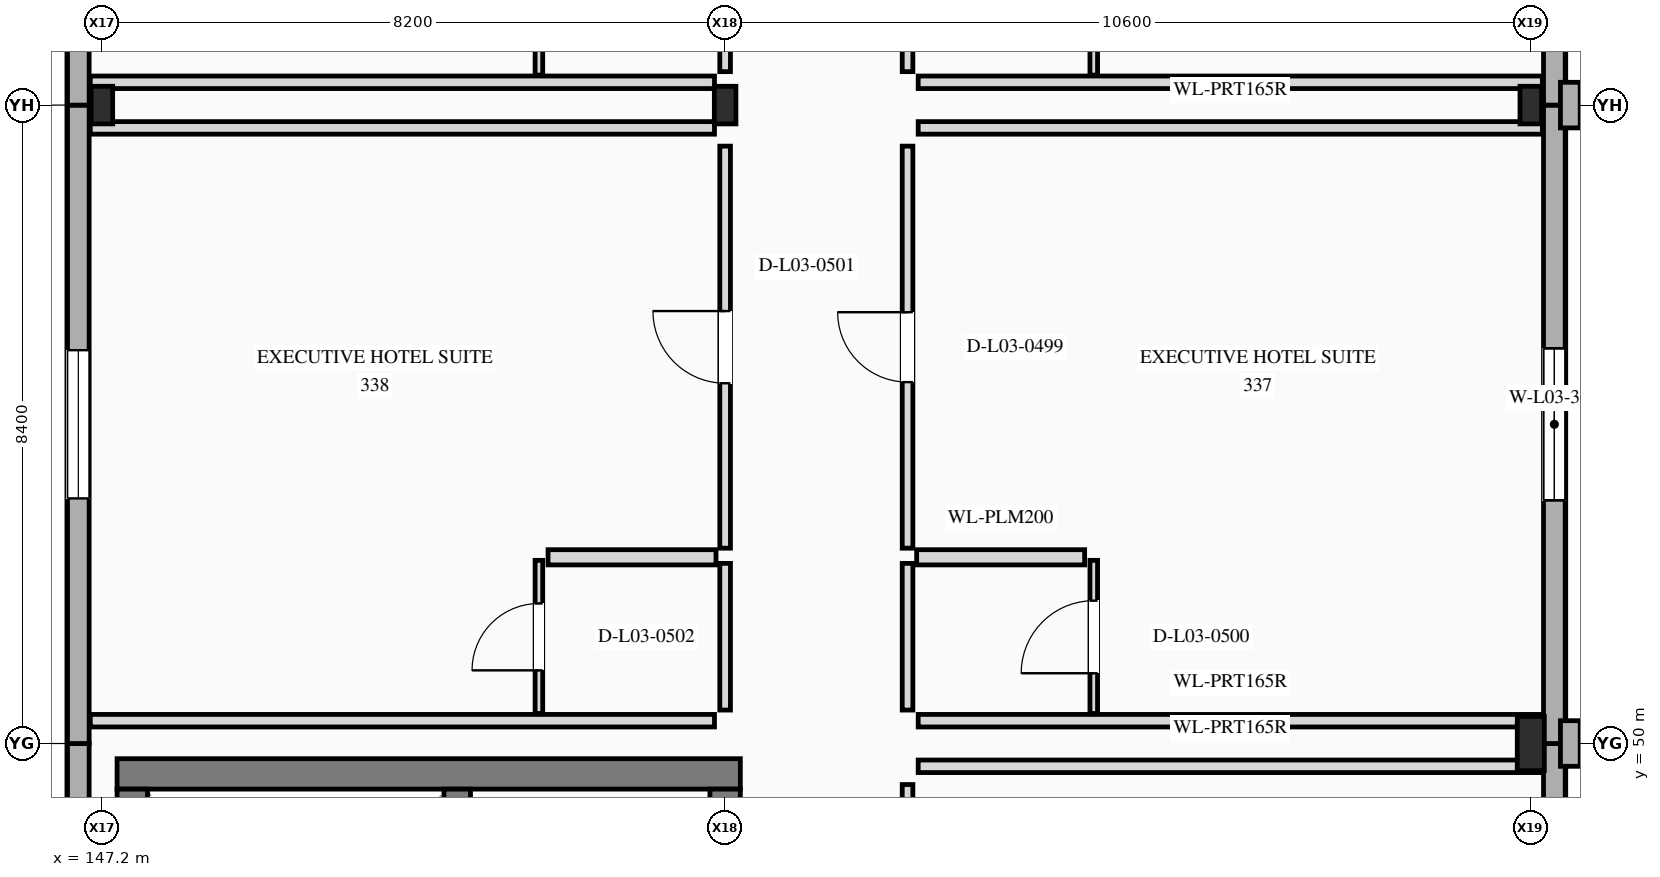
"""IFC4 building model, lengths in metres.
Left out: names, types, materials, properties, quantities, classifications, styles, units other than length and angle.
Written with IfcOpenShell. Run it as: python <this file> out.ifc"""

import sys

from ifc_helpers import new_model, si_unit, direction, frame, frame_2d, origin, origin_2d, place, context, subcontext, project, spatial, rectangle, i_section, extrude, element, fill, save


model = new_model("IFC4")
c1 = context("Model", 3, precision=1e-05, world=origin(), true_north=direction((0.0, 1.0)))
c2 = subcontext(c1, "Body", "Model", "MODEL_VIEW")
j1 = project(units=[si_unit("LENGTHUNIT", "METRE"), si_unit("PLANEANGLEUNIT", "RADIAN")], contexts=[c1])
p1 = place(None, origin())
s1 = spatial("IfcSite", under=j1, at=p1, CompositionType="ELEMENT")
p2 = place(p1, origin())
s2 = spatial("IfcBuilding", under=s1, at=p2, CompositionType="ELEMENT")
p3 = place(p2, frame((0.0, 0.0, 15.6)))
s3 = spatial("IfcBuildingStorey", under=s2, at=p3, CompositionType="ELEMENT", Elevation=15.6)
for number, where, z_axis, x_axis in (
    (1, (147.2, 58.4, 0.0), (0.0, 0.0, 1.0), (1.0, 0.0, 0.0)),
    (2, (155.4, 58.4, 0.0), (0.0, 0.0, 1.0), (1.0, 0.0, 0.0)),
):
    element("IfcColumn", number, at=place(p3, frame(where, z_axis=z_axis, x_axis=x_axis)), inside=s3, PredefinedType="COLUMN", context=c2, shape_type="SweptSolid", body=[
        extrude(i_section(OverallWidth=0.284, OverallDepth=0.495, WebThickness=0.019, FlangeThickness=0.033, at=origin_2d()), origin(), (0.0, 0.0, 1.0), 3.9),
    ])
p4 = place(p3, frame((166.0, 50.0, 0.0), z_axis=(0.0, 0.0, 1.0), x_axis=(1.0, 0.0, 0.0)))
e3 = element("IfcColumn", 3, at=p4, inside=s3, PredefinedType="COLUMN", context=c2, shape_type="SweptSolid", body=[
    extrude(i_section(OverallWidth=0.356, OverallDepth=0.714, WebThickness=0.019, FlangeThickness=0.034, at=origin_2d()), origin(), (0.0, 0.0, 1.0), 3.9),
])
p5 = place(p3, frame((166.0, 58.4, 0.0), z_axis=(0.0, 0.0, 1.0), x_axis=(1.0, 0.0, 0.0)))
e4 = element("IfcColumn", 4, at=p5, inside=s3, PredefinedType="COLUMN", context=c2, shape_type="SweptSolid", body=[
    extrude(i_section(OverallWidth=0.284, OverallDepth=0.495, WebThickness=0.019, FlangeThickness=0.033, at=origin_2d()), origin(), (0.0, 0.0, 1.0), 3.9),
])
p6 = place(p3, frame((166.31, 47.86, 0.0), z_axis=(0.0, 0.0, 1.0), x_axis=(0.0, 1.0, 0.0)))
e5 = element("IfcWall", 5, at=p6, inside=s3, PredefinedType="STANDARD", context=c2, shape_type="SweptSolid", body=[
    extrude(rectangle(XDim=2.14, YDim=0.285, at=frame_2d((1.07, 0.0))), origin(), (0.0, 0.0, 1.0), 3.9),
])
p7 = place(p3, frame((166.31, 50.0, 0.0), z_axis=(0.0, 0.0, 1.0), x_axis=(0.0, 1.0, 0.0)))
e6 = element("IfcWall", 6, at=p7, inside=s3, PredefinedType="STANDARD", context=c2, shape_type="SweptSolid", body=[
    extrude(rectangle(XDim=8.4, YDim=0.285, at=frame_2d((4.2, 0.0))), origin(), (0.0, 0.0, 1.0), 3.9),
])
p8 = place(p7, frame((3.2, 0.0, 0.85)))
e7 = element("IfcOpeningElement", 7, at=p8, cuts=e6, PredefinedType="OPENING", context=c2, shape_type="SweptSolid", body=[
    extrude(rectangle(XDim=2.0, YDim=1.65, at=frame_2d((1.0, 0.825))), frame((0.0, 0.152, 0.0), z_axis=(0.0, -1.0, 0.0), x_axis=(1.0, 0.0, 0.0)), (0.0, 0.0, 1.0), 0.305),
])
p9 = place(p3, frame((166.52, 49.7, 0.0), z_axis=(0.0, 0.0, 1.0), x_axis=(0.0, 1.0, 0.0)))
e8 = element("IfcWall", 8, at=p9, inside=s3, PredefinedType="ELEMENTEDWALL", context=c2, shape_type="SweptSolid", body=[
    extrude(rectangle(XDim=0.6, YDim=0.26, at=frame_2d((0.3, 0.0))), origin(), (0.0, 0.0, 1.0), 3.9),
])
p10 = place(p3, frame((166.31, 58.4, 0.0), z_axis=(0.0, 0.0, 1.0), x_axis=(0.0, 1.0, 0.0)))
e9 = element("IfcWall", 9, at=p10, inside=s3, PredefinedType="STANDARD", context=c2, shape_type="SweptSolid", body=[
    extrude(rectangle(XDim=8.71, YDim=0.285, at=frame_2d((4.355, 0.0))), origin(), (0.0, 0.0, 1.0), 3.9),
])
p11 = place(p10, frame((3.2, 0.0, 0.85)))
e10 = element("IfcOpeningElement", 10, at=p11, cuts=e9, PredefinedType="OPENING", context=c2, shape_type="SweptSolid", body=[
    extrude(rectangle(XDim=2.0, YDim=1.65, at=frame_2d((1.0, 0.825))), frame((0.0, 0.152, 0.0), z_axis=(0.0, -1.0, 0.0), x_axis=(1.0, 0.0, 0.0)), (0.0, 0.0, 1.0), 0.305),
])
p12 = place(p3, frame((166.52, 58.1, 0.0), z_axis=(0.0, 0.0, 1.0), x_axis=(0.0, 1.0, 0.0)))
e11 = element("IfcWall", 11, at=p12, inside=s3, PredefinedType="ELEMENTEDWALL", context=c2, shape_type="SweptSolid", body=[
    extrude(rectangle(XDim=0.6, YDim=0.26, at=frame_2d((0.3, 0.0))), origin(), (0.0, 0.0, 1.0), 3.9),
])
p13 = place(p3, frame((146.89, 41.6, 0.0), z_axis=(0.0, 0.0, 1.0), x_axis=(0.0, 1.0, 0.0)))
e12 = element("IfcWall", 12, at=p13, inside=s3, PredefinedType="STANDARD", context=c2, shape_type="SweptSolid", body=[
    extrude(rectangle(XDim=8.4, YDim=0.285, at=frame_2d((4.2, 0.0))), origin(), (0.0, 0.0, 1.0), 3.9),
])
p14 = place(p3, frame((146.89, 50.0, 0.0), z_axis=(0.0, 0.0, 1.0), x_axis=(0.0, 1.0, 0.0)))
e13 = element("IfcWall", 13, at=p14, inside=s3, PredefinedType="STANDARD", context=c2, shape_type="SweptSolid", body=[
    extrude(rectangle(XDim=8.4, YDim=0.285, at=frame_2d((4.2, 0.0))), origin(), (0.0, 0.0, 1.0), 3.9),
])
p15 = place(p14, frame((3.225, 0.0, 0.85)))
e14 = element("IfcOpeningElement", 14, at=p15, cuts=e13, PredefinedType="OPENING", context=c2, shape_type="SweptSolid", body=[
    extrude(rectangle(XDim=1.95, YDim=1.85, at=frame_2d((0.975, 0.925))), frame((0.0, 0.152, 0.0), z_axis=(0.0, -1.0, 0.0), x_axis=(1.0, 0.0, 0.0)), (0.0, 0.0, 1.0), 0.305),
])
p16 = place(p3, frame((146.89, 58.4, 0.0), z_axis=(0.0, 0.0, 1.0), x_axis=(0.0, 1.0, 0.0)))
e15 = element("IfcWall", 15, at=p16, inside=s3, PredefinedType="STANDARD", context=c2, shape_type="SweptSolid", body=[
    extrude(rectangle(XDim=8.71, YDim=0.285, at=frame_2d((4.355, 0.0))), origin(), (0.0, 0.0, 1.0), 3.9),
])
p17 = place(p16, frame((3.2, 0.0, 0.85)))
e16 = element("IfcOpeningElement", 16, at=p17, cuts=e15, PredefinedType="OPENING", context=c2, shape_type="SweptSolid", body=[
    extrude(rectangle(XDim=2.0, YDim=1.65, at=frame_2d((1.0, 0.825))), frame((0.0, 0.152, 0.0), z_axis=(0.0, -1.0, 0.0), x_axis=(1.0, 0.0, 0.0)), (0.0, 0.0, 1.0), 0.305),
])
p18 = place(p3, frame((155.6, 49.6, 0.0), z_axis=(0.0, 0.0, 1.0), x_axis=(-1.0, 0.0, 0.0)))
e17 = element("IfcWall", 17, at=p18, inside=s3, PredefinedType="SHEAR", context=c2, shape_type="SweptSolid", body=[
    extrude(rectangle(XDim=8.2, YDim=0.4, at=frame_2d((4.1, 0.0))), origin(), (0.0, 0.0, 1.0), 3.9),
])
p19 = place(p3, frame((147.6, 49.4, 0.0), z_axis=(0.0, 0.0, 1.0), x_axis=(0.0, -1.0, 0.0)))
e18 = element("IfcWall", 18, at=p19, inside=s3, PredefinedType="SHEAR", context=c2, shape_type="SweptSolid", body=[
    extrude(rectangle(XDim=9.4, YDim=0.4, at=frame_2d((4.7, 0.0))), origin(), (0.0, 0.0, 1.0), 3.9),
])
p20 = place(p3, frame((155.4, 40.0, 0.0), z_axis=(0.0, 0.0, 1.0), x_axis=(0.0, 1.0, 0.0)))
e19 = element("IfcWall", 19, at=p20, inside=s3, PredefinedType="SHEAR", context=c2, shape_type="SweptSolid", body=[
    extrude(rectangle(XDim=9.4, YDim=0.4, at=frame_2d((4.7, 0.0))), origin(), (0.0, 0.0, 1.0), 3.9),
])
p21 = place(p20, frame((1.05, 0.0, 0.0)))
e20 = element("IfcOpeningElement", 20, at=p21, cuts=e19, PredefinedType="OPENING", context=c2, shape_type="SweptSolid", body=[
    extrude(rectangle(XDim=1.1, YDim=2.2, at=frame_2d((0.55, 1.1))), frame((0.0, 0.21, 0.0), z_axis=(0.0, -1.0, 0.0), x_axis=(1.0, 0.0, 0.0)), (0.0, 0.0, 1.0), 0.42),
])
p22 = place(p20, frame((3.95, 0.0, 0.0)))
e21 = element("IfcOpeningElement", 21, at=p22, cuts=e19, PredefinedType="OPENING", context=c2, shape_type="SweptSolid", body=[
    extrude(rectangle(XDim=1.1, YDim=2.2, at=frame_2d((0.55, 1.1))), frame((0.0, 0.21, 0.0), z_axis=(0.0, -1.0, 0.0), x_axis=(1.0, 0.0, 0.0)), (0.0, 0.0, 1.0), 0.42),
])
p23 = place(p20, frame((6.875, 0.0, 0.0)))
e22 = element("IfcOpeningElement", 22, at=p23, cuts=e19, PredefinedType="OPENING", context=c2, shape_type="SweptSolid", body=[
    extrude(rectangle(XDim=1.35, YDim=2.3, at=frame_2d((0.675, 1.15))), frame((0.0, 0.21, 0.0), z_axis=(0.0, -1.0, 0.0), x_axis=(1.0, 0.0, 0.0)), (0.0, 0.0, 1.0), 0.42),
])
p24 = place(p3, frame((151.875, 40.0, 0.0), z_axis=(0.0, 0.0, 1.0), x_axis=(0.0, 1.0, 0.0)))
e23 = element("IfcWall", 23, at=p24, inside=s3, PredefinedType="SHEAR", context=c2, shape_type="SweptSolid", body=[
    extrude(rectangle(XDim=9.4, YDim=0.35, at=frame_2d((4.7, 0.0))), origin(), (0.0, 0.0, 1.0), 3.9),
])
p25 = place(p3, frame((157.8, 44.17, 0.0), z_axis=(0.0, 0.0, 1.0), x_axis=(0.0, 1.0, 0.0)))
e24 = element("IfcWall", 24, at=p25, inside=s3, PredefinedType="PARTITIONING", context=c2, shape_type="SweptSolid", body=[
    extrude(rectangle(XDim=5.29, YDim=0.14, at=frame_2d((2.645, 0.0))), origin(), (0.0, 0.0, 1.0), 3.6),
])
p26 = place(p25, frame((2.11, 0.0, 0.0)))
e25 = element("IfcOpeningElement", 25, at=p26, cuts=e24, PredefinedType="OPENING", context=c2, shape_type="SweptSolid", body=[
    extrude(rectangle(XDim=1.07, YDim=2.25, at=frame_2d((0.535, 1.125))), frame((0.0, 0.08, 0.0), z_axis=(0.0, -1.0, 0.0), x_axis=(1.0, 0.0, 0.0)), (0.0, 0.0, 1.0), 0.16),
])
p27 = place(p3, frame((157.94, 49.7, 0.0), z_axis=(0.0, 0.0, 1.0), x_axis=(1.0, 0.0, 0.0)))
e26 = element("IfcWall", 26, at=p27, inside=s3, PredefinedType="PARTITIONING", context=c2, shape_type="SweptSolid", body=[
    extrude(rectangle(XDim=8.213, YDim=0.165, at=frame_2d((4.106, 0.0))), origin(), (0.0, 0.0, 1.0), 2.99),
])
p28 = place(p3, frame((157.8, 50.44, 0.0), z_axis=(0.0, 0.0, 1.0), x_axis=(0.0, 1.0, 0.0)))
e27 = element("IfcWall", 27, at=p28, inside=s3, PredefinedType="PARTITIONING", context=c2, shape_type="SweptSolid", body=[
    extrude(rectangle(XDim=1.93, YDim=0.14, at=frame_2d((0.965, 0.0))), origin(), (0.0, 0.0, 1.0), 3.153),
])
p29 = place(p3, frame((157.8, 52.57, 0.0), z_axis=(0.0, 0.0, 1.0), x_axis=(0.0, 1.0, 0.0)))
e28 = element("IfcWall", 28, at=p29, inside=s3, PredefinedType="PARTITIONING", context=c2, shape_type="SweptSolid", body=[
    extrude(rectangle(XDim=5.29, YDim=0.14, at=frame_2d((2.645, 0.0))), origin(), (0.0, 0.0, 1.0), 3.153),
])
p30 = place(p29, frame((2.185, 0.0, 0.0)))
e29 = element("IfcOpeningElement", 29, at=p30, cuts=e28, PredefinedType="OPENING", context=c2, shape_type="SweptSolid", body=[
    extrude(rectangle(XDim=0.92, YDim=2.3, at=frame_2d((0.46, 1.15))), frame((0.0, 0.08, 0.0), z_axis=(0.0, -1.0, 0.0), x_axis=(1.0, 0.0, 0.0)), (0.0, 0.0, 1.0), 0.16),
])
for number, where, z_axis, x_axis in (
    (30, (157.94, 50.3, 0.0), (0.0, 0.0, 1.0), (1.0, 0.0, 0.0)),
    (31, (157.94, 58.1, 0.0), (0.0, 0.0, 1.0), (1.0, 0.0, 0.0)),
):
    element("IfcWall", number, at=place(p3, frame(where, z_axis=z_axis, x_axis=x_axis)), inside=s3, PredefinedType="PARTITIONING", context=c2, shape_type="SweptSolid", body=[
        extrude(rectangle(XDim=8.213, YDim=0.165, at=frame_2d((4.106, 0.0))), origin(), (0.0, 0.0, 1.0), 2.99),
    ])
p31 = place(p3, frame((157.92, 52.45, 0.0), z_axis=(0.0, 0.0, 1.0), x_axis=(1.0, 0.0, 0.0)))
e32 = element("IfcWall", 32, at=p31, inside=s3, PredefinedType="PLUMBINGWALL", context=c2, shape_type="SweptSolid", body=[
    extrude(rectangle(XDim=2.21, YDim=0.2, at=frame_2d((1.105, 0.0))), origin(), (0.0, 0.0, 1.0), 3.6),
])
p32 = place(p3, frame((160.25, 50.395, 0.0), z_axis=(0.0, 0.0, 1.0), x_axis=(0.0, 1.0, 0.0)))
e33 = element("IfcWall", 33, at=p32, inside=s3, PredefinedType="PARTITIONING", context=c2, shape_type="SweptSolid", body=[
    extrude(rectangle(XDim=2.015, YDim=0.1, at=frame_2d((1.008, 0.0))), origin(), (0.0, 0.0, 1.0), 3.153),
])
p33 = place(p32, frame((0.53, 0.0, 0.0)))
e34 = element("IfcOpeningElement", 34, at=p33, cuts=e33, PredefinedType="OPENING", context=c2, shape_type="SweptSolid", body=[
    extrude(rectangle(XDim=0.955, YDim=2.22, at=frame_2d((0.478, 1.11))), frame((0.0, 0.06, 0.0), z_axis=(0.0, -1.0, 0.0), x_axis=(1.0, 0.0, 0.0)), (0.0, 0.0, 1.0), 0.12),
])
p34 = place(p3, frame((155.4, 50.44, 0.0), z_axis=(0.0, 0.0, 1.0), x_axis=(0.0, 1.0, 0.0)))
e35 = element("IfcWall", 35, at=p34, inside=s3, PredefinedType="PARTITIONING", context=c2, shape_type="SweptSolid", body=[
    extrude(rectangle(XDim=1.93, YDim=0.14, at=frame_2d((0.965, 0.0))), origin(), (0.0, 0.0, 1.0), 2.99),
])
p35 = place(p3, frame((155.4, 52.57, 0.0), z_axis=(0.0, 0.0, 1.0), x_axis=(0.0, 1.0, 0.0)))
e36 = element("IfcWall", 36, at=p35, inside=s3, PredefinedType="PARTITIONING", context=c2, shape_type="SweptSolid", body=[
    extrude(rectangle(XDim=5.29, YDim=0.14, at=frame_2d((2.645, 0.0))), origin(), (0.0, 0.0, 1.0), 2.99),
])
p36 = place(p35, frame((2.17, 0.0, 0.0)))
e37 = element("IfcOpeningElement", 37, at=p36, cuts=e36, PredefinedType="OPENING", context=c2, shape_type="SweptSolid", body=[
    extrude(rectangle(XDim=0.95, YDim=2.3, at=frame_2d((0.475, 1.15))), frame((0.0, 0.08, 0.0), z_axis=(0.0, -1.0, 0.0), x_axis=(1.0, 0.0, 0.0)), (0.0, 0.0, 1.0), 0.16),
])
p37 = place(p3, frame((147.048, 50.3, 0.0), z_axis=(0.0, 0.0, 1.0), x_axis=(1.0, 0.0, 0.0)))
e38 = element("IfcWall", 38, at=p37, inside=s3, PredefinedType="PARTITIONING", context=c2, shape_type="SweptSolid", body=[
    extrude(rectangle(XDim=8.212, YDim=0.165, at=frame_2d((4.106, 0.0))), origin(), (0.0, 0.0, 1.0), 3.6),
])
p38 = place(p3, frame((147.048, 58.1, 0.0), z_axis=(0.0, 0.0, 1.0), x_axis=(1.0, 0.0, 0.0)))
e39 = element("IfcWall", 39, at=p38, inside=s3, PredefinedType="PARTITIONING", context=c2, shape_type="SweptSolid", body=[
    extrude(rectangle(XDim=8.212, YDim=0.165, at=frame_2d((4.106, 0.0))), origin(), (0.0, 0.0, 1.0), 3.013),
])
p39 = place(p3, frame((153.07, 52.45, 0.0), z_axis=(0.0, 0.0, 1.0), x_axis=(1.0, 0.0, 0.0)))
e40 = element("IfcWall", 40, at=p39, inside=s3, PredefinedType="PLUMBINGWALL", context=c2, shape_type="SweptSolid", body=[
    extrude(rectangle(XDim=2.21, YDim=0.2, at=frame_2d((1.105, 0.0))), origin(), (0.0, 0.0, 1.0), 3.6),
])
p40 = place(p3, frame((152.95, 50.395, 0.0), z_axis=(0.0, 0.0, 1.0), x_axis=(0.0, 1.0, 0.0)))
e41 = element("IfcWall", 41, at=p40, inside=s3, PredefinedType="PARTITIONING", context=c2, shape_type="SweptSolid", body=[
    extrude(rectangle(XDim=2.015, YDim=0.1, at=frame_2d((1.008, 0.0))), origin(), (0.0, 0.0, 1.0), 3.6),
])
p41 = place(p40, frame((0.568, 0.0, 0.0)))
e42 = element("IfcOpeningElement", 42, at=p41, cuts=e41, PredefinedType="OPENING", context=c2, shape_type="SweptSolid", body=[
    extrude(rectangle(XDim=0.88, YDim=2.1, at=frame_2d((0.44, 1.05))), frame((0.0, 0.06, 0.0), z_axis=(0.0, -1.0, 0.0), x_axis=(1.0, 0.0, 0.0)), (0.0, 0.0, 1.0), 0.12),
])
p42 = place(p3, frame((157.8, 58.84, 0.0), z_axis=(0.0, 0.0, 1.0), x_axis=(0.0, 1.0, 0.0)))
e43 = element("IfcWall", 43, at=p42, inside=s3, PredefinedType="PARTITIONING", context=c2, shape_type="SweptSolid", body=[
    extrude(rectangle(XDim=1.93, YDim=0.14, at=frame_2d((0.965, 0.0))), origin(), (0.0, 0.0, 1.0), 3.158),
])
p43 = place(p3, frame((157.94, 58.7, 0.0), z_axis=(0.0, 0.0, 1.0), x_axis=(1.0, 0.0, 0.0)))
e44 = element("IfcWall", 44, at=p43, inside=s3, PredefinedType="PARTITIONING", context=c2, shape_type="SweptSolid", body=[
    extrude(rectangle(XDim=8.213, YDim=0.165, at=frame_2d((4.106, 0.0))), origin(), (0.0, 0.0, 1.0), 2.99),
])
p44 = place(p3, frame((160.25, 58.794, 0.0), z_axis=(0.0, 0.0, 1.0), x_axis=(0.0, 1.0, 0.0)))
e45 = element("IfcWall", 45, at=p44, inside=s3, PredefinedType="PARTITIONING", context=c2, shape_type="SweptSolid", body=[
    extrude(rectangle(XDim=2.016, YDim=0.1, at=frame_2d((1.008, 0.0))), origin(), (0.0, 0.0, 1.0), 3.158),
])
p45 = place(p44, frame((0.555, 0.0, 0.0)))
e46 = element("IfcOpeningElement", 46, at=p45, cuts=e45, PredefinedType="OPENING", context=c2, shape_type="SweptSolid", body=[
    extrude(rectangle(XDim=0.905, YDim=2.1, at=frame_2d((0.453, 1.05))), frame((0.0, 0.06, 0.0), z_axis=(0.0, -1.0, 0.0), x_axis=(1.0, 0.0, 0.0)), (0.0, 0.0, 1.0), 0.12),
])
p46 = place(p3, frame((155.4, 58.84, 0.0), z_axis=(0.0, 0.0, 1.0), x_axis=(0.0, 1.0, 0.0)))
e47 = element("IfcWall", 47, at=p46, inside=s3, PredefinedType="PARTITIONING", context=c2, shape_type="SweptSolid", body=[
    extrude(rectangle(XDim=1.93, YDim=0.14, at=frame_2d((0.965, 0.0))), origin(), (0.0, 0.0, 1.0), 3.074),
])
p47 = place(p3, frame((147.048, 58.7, 0.0), z_axis=(0.0, 0.0, 1.0), x_axis=(1.0, 0.0, 0.0)))
e48 = element("IfcWall", 48, at=p47, inside=s3, PredefinedType="PARTITIONING", context=c2, shape_type="SweptSolid", body=[
    extrude(rectangle(XDim=8.212, YDim=0.165, at=frame_2d((4.106, 0.0))), origin(), (0.0, 0.0, 1.0), 3.013),
])
p48 = place(p3, frame((152.95, 58.794, 0.0), z_axis=(0.0, 0.0, 1.0), x_axis=(0.0, 1.0, 0.0)))
e49 = element("IfcWall", 49, at=p48, inside=s3, PredefinedType="PARTITIONING", context=c2, shape_type="SweptSolid", body=[
    extrude(rectangle(XDim=2.016, YDim=0.1, at=frame_2d((1.008, 0.0))), origin(), (0.0, 0.0, 1.0), 3.208),
])
p49 = place(p48, frame((0.543, 0.0, 0.0)))
e50 = element("IfcOpeningElement", 50, at=p49, cuts=e49, PredefinedType="OPENING", context=c2, shape_type="SweptSolid", body=[
    extrude(rectangle(XDim=0.93, YDim=2.14, at=frame_2d((0.465, 1.07))), frame((0.0, 0.06, 0.0), z_axis=(0.0, -1.0, 0.0), x_axis=(1.0, 0.0, 0.0)), (0.0, 0.0, 1.0), 0.12),
])
p50 = place(p8, origin())
e51 = element("IfcWindow", 51, at=p50, inside=s3, PartitioningType="SINGLE_PANEL", PredefinedType="WINDOW", context=c2, shape_type="SweptSolid", body=[
    extrude(rectangle(XDim=2.0, YDim=1.65, at=frame_2d((1.0, 0.825))), frame((0.0, 0.03, 0.0), z_axis=(0.0, -1.0, 0.0), x_axis=(1.0, 0.0, 0.0)), (0.0, 0.0, 1.0), 0.06),
])
fill(e7, e51)
p51 = place(p15, origin())
e52 = element("IfcWindow", 52, at=p51, inside=s3, PartitioningType="SINGLE_PANEL", PredefinedType="WINDOW", context=c2, shape_type="SweptSolid", body=[
    extrude(rectangle(XDim=1.95, YDim=1.85, at=frame_2d((0.975, 0.925))), frame((0.0, 0.03, 0.0), z_axis=(0.0, -1.0, 0.0), x_axis=(1.0, 0.0, 0.0)), (0.0, 0.0, 1.0), 0.06),
])
fill(e14, e52)
p52 = place(p30, origin())
e53 = element("IfcDoor", 53, at=p52, inside=s3, OperationType="SINGLE_SWING_RIGHT", PredefinedType="DOOR", context=c2, shape_type="SweptSolid", body=[
    extrude(rectangle(XDim=0.92, YDim=2.3, at=frame_2d((0.46, 1.15))), frame((0.0, 0.025, 0.0), z_axis=(0.0, -1.0, 0.0), x_axis=(1.0, 0.0, 0.0)), (0.0, 0.0, 1.0), 0.05),
])
fill(e29, e53)
p53 = place(p33, origin())
e54 = element("IfcDoor", 54, at=p53, inside=s3, OperationType="SINGLE_SWING_LEFT", PredefinedType="DOOR", context=c2, shape_type="SweptSolid", body=[
    extrude(rectangle(XDim=0.955, YDim=2.22, at=frame_2d((0.478, 1.11))), frame((0.0, 0.025, 0.0), z_axis=(0.0, -1.0, 0.0), x_axis=(1.0, 0.0, 0.0)), (0.0, 0.0, 1.0), 0.05),
])
fill(e34, e54)
p54 = place(p36, origin())
e55 = element("IfcDoor", 55, at=p54, inside=s3, OperationType="SINGLE_SWING_RIGHT", PredefinedType="DOOR", context=c2, shape_type="SweptSolid", body=[
    extrude(rectangle(XDim=0.95, YDim=2.3, at=frame_2d((0.475, 1.15))), frame((0.0, 0.025, 0.0), z_axis=(0.0, -1.0, 0.0), x_axis=(1.0, 0.0, 0.0)), (0.0, 0.0, 1.0), 0.05),
])
fill(e37, e55)
p55 = place(p41, origin())
e56 = element("IfcDoor", 56, at=p55, inside=s3, OperationType="SINGLE_SWING_LEFT", PredefinedType="DOOR", context=c2, shape_type="SweptSolid", body=[
    extrude(rectangle(XDim=0.88, YDim=2.1, at=frame_2d((0.44, 1.05))), frame((0.0, 0.025, 0.0), z_axis=(0.0, -1.0, 0.0), x_axis=(1.0, 0.0, 0.0)), (0.0, 0.0, 1.0), 0.05),
])
fill(e42, e56)
save(model, sys.argv[1])
